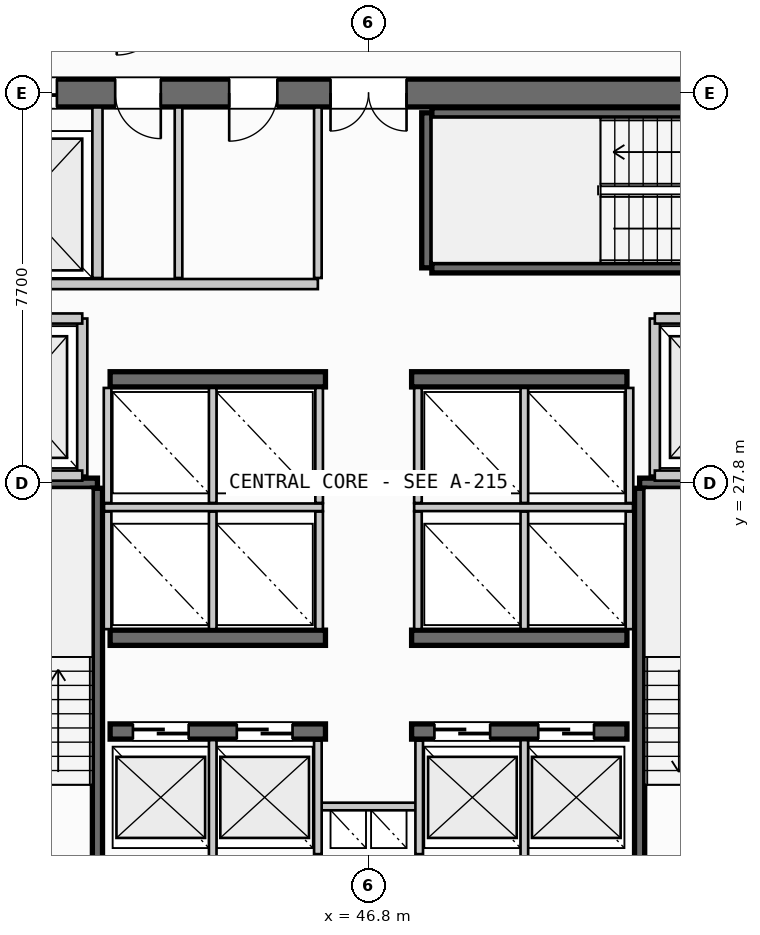
"""IFC4 building model, lengths in metres.
Left out: names, types, materials, properties, quantities, classifications, styles, units other than length and angle.
Written with IfcOpenShell. Run it as: python <this file> out.ifc"""

import sys

from ifc_helpers import new_model, si_unit, direction, frame, frame_2d, origin, place, context, subcontext, project, spatial, rectangle, extrude, source, transform, mapped, element, fill, save


model = new_model("IFC4")
c1 = context("Model", 3, precision=1e-05, world=origin(), true_north=direction((0.0, 1.0)))
c2 = subcontext(c1, "Body", "Model", "MODEL_VIEW")
j1 = project(units=[si_unit("LENGTHUNIT", "METRE"), si_unit("PLANEANGLEUNIT", "RADIAN")], contexts=[c1])
p1 = place(None, origin())
s1 = spatial("IfcSite", under=j1, at=p1, CompositionType="ELEMENT")
p2 = place(p1, origin())
s2 = spatial("IfcBuilding", under=s1, at=p2, CompositionType="ELEMENT")
p3 = place(p2, frame((0.0, 0.0, 110.8)))
s3 = spatial("IfcBuildingStorey", under=s2, at=p3, CompositionType="ELEMENT", Elevation=110.8)
p4 = place(p3, frame((55.6, 35.5, 0.0), z_axis=(0.0, 0.0, 1.0), x_axis=(-1.0, 0.0, 0.0)))
e1 = element("IfcWall", 1, at=p4, inside=s3, PredefinedType="SHEAR", context=c2, shape_type="SweptSolid", body=[
    extrude(rectangle(XDim=17.6, YDim=0.55, at=frame_2d((8.8, 0.0))), origin(), (0.0, 0.0, 1.0), 3.35),
])
p5 = place(p4, frame((8.05, 0.0, 0.0)))
e2 = element("IfcOpeningElement", 2, at=p5, cuts=e1, PredefinedType="OPENING", context=c2, shape_type="SweptSolid", body=[
    extrude(rectangle(XDim=1.5, YDim=2.2, at=frame_2d((0.75, 1.1))), frame((0.0, 0.285, 0.0), z_axis=(0.0, -1.0, 0.0), x_axis=(1.0, 0.0, 0.0)), (0.0, 0.0, 1.0), 0.57),
])
p6 = place(p4, frame((14.95, 0.0, 0.0)))
e3 = element("IfcOpeningElement", 3, at=p6, cuts=e1, PredefinedType="OPENING", context=c2, shape_type="SweptSolid", body=[
    extrude(rectangle(XDim=1.4, YDim=2.3, at=frame_2d((0.7, 1.15))), frame((0.0, 0.285, 0.0), z_axis=(0.0, -1.0, 0.0), x_axis=(1.0, 0.0, 0.0)), (0.0, 0.0, 1.0), 0.57),
])
p7 = place(p4, frame((12.9, 0.0, 0.0)))
e4 = element("IfcOpeningElement", 4, at=p7, cuts=e1, PredefinedType="OPENING", context=c2, shape_type="SweptSolid", body=[
    extrude(rectangle(XDim=0.9, YDim=2.15, at=frame_2d((0.45, 1.075))), frame((0.0, 0.285, 0.0), z_axis=(0.0, -1.0, 0.0), x_axis=(1.0, 0.0, 0.0)), (0.0, 0.0, 1.0), 0.57),
])
p8 = place(p4, frame((10.6, 0.0, 0.0)))
e5 = element("IfcOpeningElement", 5, at=p8, cuts=e1, PredefinedType="OPENING", context=c2, shape_type="SweptSolid", body=[
    extrude(rectangle(XDim=0.95, YDim=2.15, at=frame_2d((0.475, 1.075))), frame((0.0, 0.285, 0.0), z_axis=(0.0, -1.0, 0.0), x_axis=(1.0, 0.0, 0.0)), (0.0, 0.0, 1.0), 0.57),
])
p9 = place(p3, frame((41.7, 22.9, 0.0), z_axis=(0.0, 0.0, 1.0), x_axis=(1.0, 0.0, 0.0)))
e6 = element("IfcWall", 6, at=p9, inside=s3, PredefinedType="SHEAR", context=c2, shape_type="SweptSolid", body=[
    extrude(rectangle(XDim=4.25, YDim=0.3, at=frame_2d((2.125, 0.0))), origin(), (0.0, 0.0, 1.0), 3.35),
])
p10 = place(p9, frame((0.45, 0.0, 0.0)))
e7 = element("IfcOpeningElement", 7, at=p10, cuts=e6, PredefinedType="OPENING", context=c2, shape_type="SweptSolid", body=[
    extrude(rectangle(XDim=1.1, YDim=2.2, at=frame_2d((0.55, 1.1))), frame((0.0, 0.16, 0.0), z_axis=(0.0, -1.0, 0.0), x_axis=(1.0, 0.0, 0.0)), (0.0, 0.0, 1.0), 0.32),
])
p11 = place(p9, frame((2.5, 0.0, 0.0)))
e8 = element("IfcOpeningElement", 8, at=p11, cuts=e6, PredefinedType="OPENING", context=c2, shape_type="SweptSolid", body=[
    extrude(rectangle(XDim=1.1, YDim=2.2, at=frame_2d((0.55, 1.1))), frame((0.0, 0.16, 0.0), z_axis=(0.0, -1.0, 0.0), x_axis=(1.0, 0.0, 0.0)), (0.0, 0.0, 1.0), 0.32),
])
p12 = place(p3, frame((47.65, 22.9, 0.0), z_axis=(0.0, 0.0, 1.0), x_axis=(1.0, 0.0, 0.0)))
e9 = element("IfcWall", 9, at=p12, inside=s3, PredefinedType="SHEAR", context=c2, shape_type="SweptSolid", body=[
    extrude(rectangle(XDim=4.25, YDim=0.3, at=frame_2d((2.125, 0.0))), origin(), (0.0, 0.0, 1.0), 3.35),
])
p13 = place(p12, frame((0.45, 0.0, 0.0)))
e10 = element("IfcOpeningElement", 10, at=p13, cuts=e9, PredefinedType="OPENING", context=c2, shape_type="SweptSolid", body=[
    extrude(rectangle(XDim=1.1, YDim=2.2, at=frame_2d((0.55, 1.1))), frame((0.0, 0.16, 0.0), z_axis=(0.0, -1.0, 0.0), x_axis=(1.0, 0.0, 0.0)), (0.0, 0.0, 1.0), 0.32),
])
p14 = place(p12, frame((2.5, 0.0, 0.0)))
e11 = element("IfcOpeningElement", 11, at=p14, cuts=e9, PredefinedType="OPENING", context=c2, shape_type="SweptSolid", body=[
    extrude(rectangle(XDim=1.1, YDim=2.2, at=frame_2d((0.55, 1.1))), frame((0.0, 0.16, 0.0), z_axis=(0.0, -1.0, 0.0), x_axis=(1.0, 0.0, 0.0)), (0.0, 0.0, 1.0), 0.32),
])
for number, where, z_axis, x_axis in (
    (12, (41.7, 24.75, 0.0), (0.0, 0.0, 1.0), (1.0, 0.0, 0.0)),
    (13, (47.65, 24.75, 0.0), (0.0, 0.0, 1.0), (1.0, 0.0, 0.0)),
    (14, (41.7, 29.85, 0.0), (0.0, 0.0, 1.0), (1.0, 0.0, 0.0)),
    (15, (47.65, 29.85, 0.0), (0.0, 0.0, 1.0), (1.0, 0.0, 0.0)),
):
    element("IfcWall", number, at=place(p3, frame(where, z_axis=z_axis, x_axis=x_axis)), inside=s3, PredefinedType="SHEAR", context=c2, shape_type="SweptSolid", body=[
        extrude(rectangle(XDim=4.25, YDim=0.3, at=frame_2d((2.125, 0.0))), origin(), (0.0, 0.0, 1.0), 3.35),
    ])
p15 = place(p3, frame((38.39, 27.8, 0.0), z_axis=(0.0, 0.0, 1.0), x_axis=(1.0, 0.0, 0.0)))
e16 = element("IfcWall", 16, at=p15, inside=s3, PredefinedType="SHEAR", context=c2, shape_type="SweptSolid", body=[
    extrude(rectangle(XDim=3.06, YDim=0.2, at=frame_2d((1.53, 0.0))), origin(), (0.0, 0.0, 1.0), 3.35),
])
p16 = place(p3, frame((41.45, 27.7, 0.0), z_axis=(0.0, 0.0, 1.0), x_axis=(0.0, -1.0, 0.0)))
e17 = element("IfcWall", 17, at=p16, inside=s3, PredefinedType="SHEAR", context=c2, shape_type="SweptSolid", body=[
    extrude(rectangle(XDim=7.35, YDim=0.2, at=frame_2d((3.675, 0.0))), origin(), (0.0, 0.0, 1.0), 3.35),
])
p17 = place(p3, frame((52.15, 27.8, 0.0), z_axis=(0.0, 0.0, 1.0), x_axis=(1.0, 0.0, 0.0)))
e18 = element("IfcWall", 18, at=p17, inside=s3, PredefinedType="SHEAR", context=c2, shape_type="SweptSolid", body=[
    extrude(rectangle(XDim=3.06, YDim=0.2, at=frame_2d((1.53, 0.0))), origin(), (0.0, 0.0, 1.0), 3.35),
])
p18 = place(p3, frame((52.15, 20.35, 0.0), z_axis=(0.0, 0.0, 1.0), x_axis=(0.0, 1.0, 0.0)))
e19 = element("IfcWall", 19, at=p18, inside=s3, PredefinedType="SHEAR", context=c2, shape_type="SweptSolid", body=[
    extrude(rectangle(XDim=7.35, YDim=0.2, at=frame_2d((3.675, 0.0))), origin(), (0.0, 0.0, 1.0), 3.35),
])
p19 = place(p3, frame((47.95, 32.05, 0.0), z_axis=(0.0, 0.0, 1.0), x_axis=(0.0, 1.0, 0.0)))
e20 = element("IfcWall", 20, at=p19, inside=s3, PredefinedType="SHEAR", context=c2, shape_type="SweptSolid", body=[
    extrude(rectangle(XDim=3.06, YDim=0.2, at=frame_2d((1.53, 0.0))), origin(), (0.0, 0.0, 1.0), 3.35),
])
for number, where, z_axis, x_axis in (
    (21, (48.05, 35.11, 0.0), (0.0, 0.0, 1.0), (1.0, 0.0, 0.0)),
    (22, (55.4, 32.05, 0.0), (0.0, 0.0, 1.0), (-1.0, 0.0, 0.0)),
):
    element("IfcWall", number, at=place(p3, frame(where, z_axis=z_axis, x_axis=x_axis)), inside=s3, PredefinedType="SHEAR", context=c2, shape_type="SweptSolid", body=[
        extrude(rectangle(XDim=7.35, YDim=0.2, at=frame_2d((3.675, 0.0))), origin(), (0.0, 0.0, 1.0), 3.35),
    ])
p20 = place(p3, frame((45.8, 21.42, 0.0), z_axis=(0.0, 0.0, 1.0), x_axis=(1.0, 0.0, 0.0)))
e23 = element("IfcWall", 23, at=p20, inside=s3, PredefinedType="PARTITIONING", context=c2, shape_type="SweptSolid", body=[
    extrude(rectangle(XDim=2.0, YDim=0.15, at=frame_2d((1.0, 0.0))), origin(), (0.0, 0.0, 1.0), 2.28),
])
for number, where, z_axis, x_axis in (
    (24, (45.8, 20.48, 0.0), (0.0, 0.0, 1.0), (0.0, 1.0, 0.0)),
    (25, (47.8, 20.48, 0.0), (0.0, 0.0, 1.0), (0.0, 1.0, 0.0)),
):
    element("IfcWall", number, at=place(p3, frame(where, z_axis=z_axis, x_axis=x_axis)), inside=s3, PredefinedType="PARTITIONING", context=c2, shape_type="SweptSolid", body=[
        extrude(rectangle(XDim=2.24, YDim=0.15, at=frame_2d((1.12, 0.0))), origin(), (0.0, 0.0, 1.0), 2.28),
    ])
p21 = place(p3, frame((41.15, 27.95, 0.0), z_axis=(0.0, 0.0, 1.0), x_axis=(0.0, 1.0, 0.0)))
e26 = element("IfcWall", 26, at=p21, inside=s3, PredefinedType="PARTITIONING", context=c2, shape_type="SweptSolid", body=[
    extrude(rectangle(XDim=3.1, YDim=0.2, at=frame_2d((1.55, 0.0))), origin(), (0.0, 0.0, 1.0), 2.28),
])
for number, where, z_axis, x_axis in (
    (27, (38.285, 27.95, 0.0), (0.0, 0.0, 1.0), (1.0, 0.0, 0.0)),
    (28, (38.285, 31.05, 0.0), (0.0, 0.0, 1.0), (1.0, 0.0, 0.0)),
):
    element("IfcWall", number, at=place(p3, frame(where, z_axis=z_axis, x_axis=x_axis)), inside=s3, PredefinedType="PARTITIONING", context=c2, shape_type="SweptSolid", body=[
        extrude(rectangle(XDim=2.865, YDim=0.2, at=frame_2d((1.433, 0.0))), origin(), (0.0, 0.0, 1.0), 2.28),
    ])
p22 = place(p3, frame((52.45, 27.95, 0.0), z_axis=(0.0, 0.0, 1.0), x_axis=(0.0, 1.0, 0.0)))
e29 = element("IfcWall", 29, at=p22, inside=s3, PredefinedType="PARTITIONING", context=c2, shape_type="SweptSolid", body=[
    extrude(rectangle(XDim=3.1, YDim=0.2, at=frame_2d((1.55, 0.0))), origin(), (0.0, 0.0, 1.0), 2.28),
])
for number, where, z_axis, x_axis in (
    (30, (52.45, 27.95, 0.0), (0.0, 0.0, 1.0), (1.0, 0.0, 0.0)),
    (31, (52.45, 31.05, 0.0), (0.0, 0.0, 1.0), (1.0, 0.0, 0.0)),
):
    element("IfcWall", number, at=place(p3, frame(where, z_axis=z_axis, x_axis=x_axis)), inside=s3, PredefinedType="PARTITIONING", context=c2, shape_type="SweptSolid", body=[
        extrude(rectangle(XDim=2.865, YDim=0.2, at=frame_2d((1.433, 0.0))), origin(), (0.0, 0.0, 1.0), 2.28),
    ])
for number, where, z_axis, x_axis in (
    (32, (43.725, 20.385, 0.0), (0.0, 0.0, 1.0), (0.0, 1.0, 0.0)),
    (33, (49.875, 20.385, 0.0), (0.0, 0.0, 1.0), (0.0, 1.0, 0.0)),
):
    element("IfcWall", number, at=place(p3, frame(where, z_axis=z_axis, x_axis=x_axis)), inside=s3, PredefinedType="PARTITIONING", context=c2, shape_type="SweptSolid", body=[
        extrude(rectangle(XDim=2.345, YDim=0.15, at=frame_2d((1.172, 0.0))), origin(), (0.0, 0.0, 1.0), 2.28),
    ])
p23 = place(p3, frame((41.58, 27.325, 0.0), z_axis=(0.0, 0.0, 1.0), x_axis=(1.0, 0.0, 0.0)))
e34 = element("IfcWall", 34, at=p23, inside=s3, PredefinedType="PARTITIONING", context=c2, shape_type="SweptSolid", body=[
    extrude(rectangle(XDim=4.32, YDim=0.15, at=frame_2d((2.16, 0.0))), origin(), (0.0, 0.0, 1.0), 2.28),
])
p24 = place(p3, frame((47.7, 27.325, 0.0), z_axis=(0.0, 0.0, 1.0), x_axis=(1.0, 0.0, 0.0)))
e35 = element("IfcWall", 35, at=p24, inside=s3, PredefinedType="PARTITIONING", context=c2, shape_type="SweptSolid", body=[
    extrude(rectangle(XDim=4.32, YDim=0.15, at=frame_2d((2.16, 0.0))), origin(), (0.0, 0.0, 1.0), 2.28),
])
for number, where, z_axis, x_axis in (
    (36, (41.65, 24.92, 0.0), (0.0, 0.0, 1.0), (0.0, 1.0, 0.0)),
    (37, (43.725, 24.92, 0.0), (0.0, 0.0, 1.0), (0.0, 1.0, 0.0)),
    (38, (45.825, 24.92, 0.0), (0.0, 0.0, 1.0), (0.0, 1.0, 0.0)),
    (39, (47.775, 24.92, 0.0), (0.0, 0.0, 1.0), (0.0, 1.0, 0.0)),
    (40, (49.875, 24.92, 0.0), (0.0, 0.0, 1.0), (0.0, 1.0, 0.0)),
    (41, (51.95, 24.92, 0.0), (0.0, 0.0, 1.0), (0.0, 1.0, 0.0)),
):
    element("IfcWall", number, at=place(p3, frame(where, z_axis=z_axis, x_axis=x_axis)), inside=s3, PredefinedType="PARTITIONING", context=c2, shape_type="SweptSolid", body=[
        extrude(rectangle(XDim=2.32, YDim=0.15, at=frame_2d((1.16, 0.0))), origin(), (0.0, 0.0, 1.0), 2.28),
    ])
for number, where, z_axis, x_axis in (
    (42, (41.65, 27.41, 0.0), (0.0, 0.0, 1.0), (0.0, 1.0, 0.0)),
    (43, (43.725, 27.41, 0.0), (0.0, 0.0, 1.0), (0.0, 1.0, 0.0)),
    (44, (45.825, 27.41, 0.0), (0.0, 0.0, 1.0), (0.0, 1.0, 0.0)),
    (45, (47.775, 27.41, 0.0), (0.0, 0.0, 1.0), (0.0, 1.0, 0.0)),
    (46, (49.875, 27.41, 0.0), (0.0, 0.0, 1.0), (0.0, 1.0, 0.0)),
    (47, (51.95, 27.41, 0.0), (0.0, 0.0, 1.0), (0.0, 1.0, 0.0)),
):
    element("IfcWall", number, at=place(p3, frame(where, z_axis=z_axis, x_axis=x_axis)), inside=s3, PredefinedType="PARTITIONING", context=c2, shape_type="SweptSolid", body=[
        extrude(rectangle(XDim=2.27, YDim=0.15, at=frame_2d((1.135, 0.0))), origin(), (0.0, 0.0, 1.0), 2.28),
    ])
p25 = place(p3, frame((41.45, 31.85, 0.0), z_axis=(0.0, 0.0, 1.0), x_axis=(0.0, 1.0, 0.0)))
e48 = element("IfcWall", 48, at=p25, inside=s3, PredefinedType="PARTITIONING", context=c2, shape_type="SweptSolid", body=[
    extrude(rectangle(XDim=3.365, YDim=0.2, at=frame_2d((1.683, 0.0))), origin(), (0.0, 0.0, 1.0), 2.28),
])
p26 = place(p3, frame((38.285, 31.73, 0.0), z_axis=(0.0, 0.0, 1.0), x_axis=(1.0, 0.0, 0.0)))
e49 = element("IfcWall", 49, at=p26, inside=s3, PredefinedType="PARTITIONING", context=c2, shape_type="SweptSolid", body=[
    extrude(rectangle(XDim=7.515, YDim=0.2, at=frame_2d((3.758, 0.0))), origin(), (0.0, 0.0, 1.0), 2.28),
])
p27 = place(p3, frame((45.8, 31.85, 0.0), z_axis=(0.0, 0.0, 1.0), x_axis=(0.0, 1.0, 0.0)))
e50 = element("IfcWall", 50, at=p27, inside=s3, PredefinedType="PARTITIONING", context=c2, shape_type="SweptSolid", body=[
    extrude(rectangle(XDim=3.365, YDim=0.15, at=frame_2d((1.683, 0.0))), origin(), (0.0, 0.0, 1.0), 2.28),
])
p28 = place(p3, frame((43.05, 31.85, 0.0), z_axis=(0.0, 0.0, 1.0), x_axis=(0.0, 1.0, 0.0)))
e51 = element("IfcWall", 51, at=p28, inside=s3, PredefinedType="PLUMBINGWALL", context=c2, shape_type="SweptSolid", body=[
    extrude(rectangle(XDim=3.365, YDim=0.15, at=frame_2d((1.683, 0.0))), origin(), (0.0, 0.0, 1.0), 2.28),
])
m1 = source(origin(), c2, "Body", "SweptSolid", [
    extrude(rectangle(XDim=1.5, YDim=2.2, at=frame_2d((0.75, 1.1))), frame((0.0, 0.025, 0.0), z_axis=(0.0, -1.0, 0.0), x_axis=(1.0, 0.0, 0.0)), (0.0, 0.0, 1.0), 0.05),
])
p29 = place(p5, origin())
e52 = element("IfcDoor", 52, at=p29, inside=s3, OperationType="DOUBLE_DOOR_SINGLE_SWING", PredefinedType="DOOR", context=c2, shape_type="MappedRepresentation", body=[
    mapped(m1, transform((0.0, 0.0, 0.0), scale=1.0)),
])
fill(e2, e52)
m2 = source(origin(), c2, "Body", "SweptSolid", [
    extrude(rectangle(XDim=1.1, YDim=2.2, at=frame_2d((0.55, 1.1))), frame((0.0, 0.025, 0.0), z_axis=(0.0, -1.0, 0.0), x_axis=(1.0, 0.0, 0.0)), (0.0, 0.0, 1.0), 0.05),
])
p30 = place(p10, origin())
e53 = element("IfcDoor", 53, at=p30, inside=s3, OperationType="SLIDING_TO_LEFT", PredefinedType="DOOR", context=c2, shape_type="MappedRepresentation", body=[
    mapped(m2, transform((0.0, 0.0, 0.0), scale=1.0)),
])
fill(e7, e53)
p31 = place(p11, origin())
e54 = element("IfcDoor", 54, at=p31, inside=s3, OperationType="SLIDING_TO_LEFT", PredefinedType="DOOR", context=c2, shape_type="MappedRepresentation", body=[
    mapped(m2, transform((0.0, 0.0, 0.0), scale=1.0)),
])
fill(e8, e54)
p32 = place(p13, origin())
e55 = element("IfcDoor", 55, at=p32, inside=s3, OperationType="SLIDING_TO_LEFT", PredefinedType="DOOR", context=c2, shape_type="MappedRepresentation", body=[
    mapped(m2, transform((0.0, 0.0, 0.0), scale=1.0)),
])
fill(e10, e55)
p33 = place(p14, origin())
e56 = element("IfcDoor", 56, at=p33, inside=s3, OperationType="SLIDING_TO_LEFT", PredefinedType="DOOR", context=c2, shape_type="MappedRepresentation", body=[
    mapped(m2, transform((0.0, 0.0, 0.0), scale=1.0)),
])
fill(e11, e56)
m3 = source(origin(), c2, "Body", "SweptSolid", [
    extrude(rectangle(XDim=1.4, YDim=2.3, at=frame_2d((0.7, 1.15))), frame((0.0, 0.025, 0.0), z_axis=(0.0, -1.0, 0.0), x_axis=(1.0, 0.0, 0.0)), (0.0, 0.0, 1.0), 0.05),
])
p34 = place(p6, origin())
e57 = element("IfcDoor", 57, at=p34, inside=s3, OperationType="SLIDING_TO_RIGHT", PredefinedType="DOOR", context=c2, shape_type="MappedRepresentation", body=[
    mapped(m3, transform((0.0, 0.0, 0.0), scale=1.0)),
])
fill(e3, e57)
m4 = source(origin(), c2, "Body", "SweptSolid", [
    extrude(rectangle(XDim=0.9, YDim=2.15, at=frame_2d((0.45, 1.075))), frame((0.0, 0.025, 0.0), z_axis=(0.0, -1.0, 0.0), x_axis=(1.0, 0.0, 0.0)), (0.0, 0.0, 1.0), 0.05),
])
p35 = place(p7, origin())
e58 = element("IfcDoor", 58, at=p35, inside=s3, OperationType="SINGLE_SWING_LEFT", PredefinedType="DOOR", context=c2, shape_type="MappedRepresentation", body=[
    mapped(m4, transform((0.0, 0.0, 0.0), scale=1.0)),
])
fill(e4, e58)
m5 = source(origin(), c2, "Body", "SweptSolid", [
    extrude(rectangle(XDim=0.95, YDim=2.15, at=frame_2d((0.475, 1.075))), frame((0.0, 0.025, 0.0), z_axis=(0.0, -1.0, 0.0), x_axis=(1.0, 0.0, 0.0)), (0.0, 0.0, 1.0), 0.05),
])
p36 = place(p8, origin())
e59 = element("IfcDoor", 59, at=p36, inside=s3, OperationType="SINGLE_SWING_RIGHT", PredefinedType="DOOR", context=c2, shape_type="MappedRepresentation", body=[
    mapped(m5, transform((0.0, 0.0, 0.0), scale=1.0)),
])
fill(e5, e59)
save(model, sys.argv[1])
